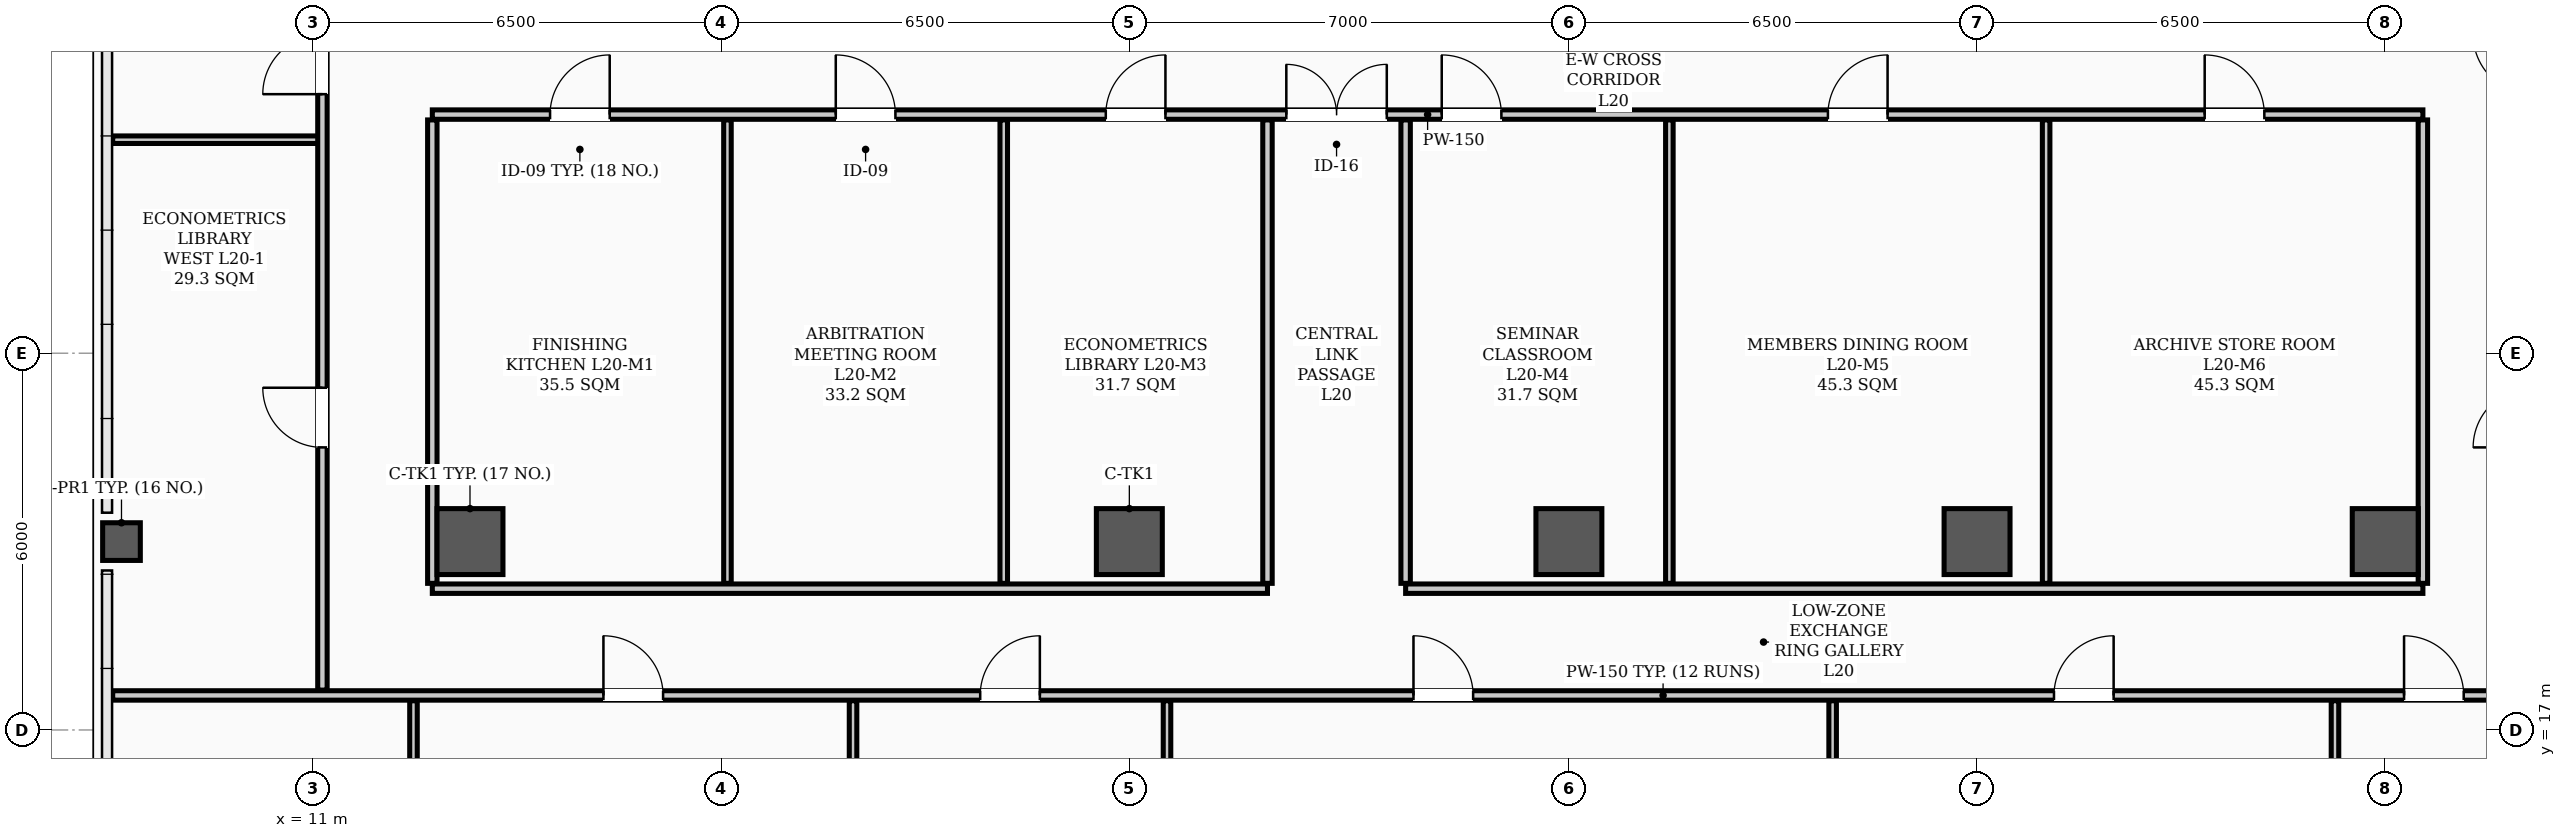
"""IFC4 building model, lengths in metres.
Left out: names, types, materials, properties, quantities, classifications, styles, units other than length and angle.
Written with IfcOpenShell. Run it as: python <this file> out.ifc"""

import sys

from ifc_helpers import new_model, si_unit, direction, frame, frame_2d, origin, origin_2d, place, context, subcontext, project, spatial, rectangle, hollow_rectangle, extrude, element, fill, save


model = new_model("IFC4")
c1 = context("Model", 3, precision=1e-05, world=origin(), true_north=direction((0.0, 1.0)))
c2 = subcontext(c1, "Body", "Model", "MODEL_VIEW")
j1 = project(units=[si_unit("LENGTHUNIT", "METRE"), si_unit("PLANEANGLEUNIT", "RADIAN")], contexts=[c1])
p1 = place(None, origin())
s1 = spatial("IfcSite", under=j1, at=p1, CompositionType="ELEMENT")
p2 = place(p1, origin())
s2 = spatial("IfcBuilding", under=s1, at=p2, CompositionType="ELEMENT")
p3 = place(p2, frame((0.0, 0.0, 81.1)))
s3 = spatial("IfcBuildingStorey", under=s2, at=p3, CompositionType="ELEMENT", Elevation=81.1)
for number, where, z_axis, x_axis in (
    (1, (13.5, 20.0, 0.0), (0.0, 0.0, 1.0), (1.0, 0.0, 0.0)),
    (2, (24.0, 20.0, 0.0), (0.0, 0.0, 1.0), (1.0, 0.0, 0.0)),
    (3, (31.0, 20.0, 0.0), (0.0, 0.0, 1.0), (1.0, 0.0, 0.0)),
    (4, (37.5, 20.0, 0.0), (0.0, 0.0, 1.0), (1.0, 0.0, 0.0)),
    (5, (44.0, 20.0, 0.0), (0.0, 0.0, 1.0), (1.0, 0.0, 0.0)),
):
    element("IfcColumn", number, at=place(p3, frame(where, z_axis=z_axis, x_axis=x_axis)), inside=s3, PredefinedType="COLUMN", context=c2, shape_type="SweptSolid", body=[
        extrude(hollow_rectangle(XDim=1.05, YDim=1.05, WallThickness=0.038, InnerFilletRadius=0.019, OuterFilletRadius=0.057, at=origin_2d()), origin(), (0.0, 0.0, 1.0), 3.9),
    ])
p4 = place(p3, frame((7.95, 20.0, 0.0), z_axis=(0.0, 0.0, 1.0), x_axis=(1.0, 0.0, 0.0)))
e6 = element("IfcColumn", 6, at=p4, inside=s3, PredefinedType="COLUMN", context=c2, shape_type="SweptSolid", body=[
    extrude(hollow_rectangle(XDim=0.6, YDim=0.6, WallThickness=0.026, InnerFilletRadius=0.013, OuterFilletRadius=0.039, at=origin_2d()), origin(), (0.0, 0.0, 1.0), 3.9),
])
p5 = place(p3, frame((12.9, 26.8, 0.0), z_axis=(0.0, 0.0, 1.0), x_axis=(1.0, 0.0, 0.0)))
e7 = element("IfcWall", 7, at=p5, inside=s3, PredefinedType="PARTITIONING", context=c2, shape_type="SweptSolid", body=[
    extrude(rectangle(XDim=31.7, YDim=0.15, at=frame_2d((15.85, 0.0))), origin(), (0.0, 0.0, 1.0), 3.1),
])
p6 = place(p5, frame((13.6, 0.0, 0.0)))
e8 = element("IfcOpeningElement", 8, at=p6, cuts=e7, PredefinedType="OPENING", context=c2, shape_type="SweptSolid", body=[
    extrude(rectangle(XDim=1.6, YDim=2.08, at=frame_2d((0.8, 1.04))), frame((0.0, 0.085, 0.0), z_axis=(0.0, -1.0, 0.0), x_axis=(1.0, 0.0, 0.0)), (0.0, 0.0, 1.0), 0.17),
])
p7 = place(p5, frame((1.875, 0.0, 0.0)))
e9 = element("IfcOpeningElement", 9, at=p7, cuts=e7, PredefinedType="OPENING", context=c2, shape_type="SweptSolid", body=[
    extrude(rectangle(XDim=0.95, YDim=2.08, at=frame_2d((0.475, 1.04))), frame((0.0, 0.085, 0.0), z_axis=(0.0, -1.0, 0.0), x_axis=(1.0, 0.0, 0.0)), (0.0, 0.0, 1.0), 0.17),
])
p8 = place(p5, frame((6.425, 0.0, 0.0)))
e10 = element("IfcOpeningElement", 10, at=p8, cuts=e7, PredefinedType="OPENING", context=c2, shape_type="SweptSolid", body=[
    extrude(rectangle(XDim=0.95, YDim=2.08, at=frame_2d((0.475, 1.04))), frame((0.0, 0.085, 0.0), z_axis=(0.0, -1.0, 0.0), x_axis=(1.0, 0.0, 0.0)), (0.0, 0.0, 1.0), 0.17),
])
p9 = place(p5, frame((10.725, 0.0, 0.0)))
e11 = element("IfcOpeningElement", 11, at=p9, cuts=e7, PredefinedType="OPENING", context=c2, shape_type="SweptSolid", body=[
    extrude(rectangle(XDim=0.95, YDim=2.08, at=frame_2d((0.475, 1.04))), frame((0.0, 0.085, 0.0), z_axis=(0.0, -1.0, 0.0), x_axis=(1.0, 0.0, 0.0)), (0.0, 0.0, 1.0), 0.17),
])
p10 = place(p5, frame((16.075, 0.0, 0.0)))
e12 = element("IfcOpeningElement", 12, at=p10, cuts=e7, PredefinedType="OPENING", context=c2, shape_type="SweptSolid", body=[
    extrude(rectangle(XDim=0.95, YDim=2.08, at=frame_2d((0.475, 1.04))), frame((0.0, 0.085, 0.0), z_axis=(0.0, -1.0, 0.0), x_axis=(1.0, 0.0, 0.0)), (0.0, 0.0, 1.0), 0.17),
])
p11 = place(p5, frame((22.225, 0.0, 0.0)))
e13 = element("IfcOpeningElement", 13, at=p11, cuts=e7, PredefinedType="OPENING", context=c2, shape_type="SweptSolid", body=[
    extrude(rectangle(XDim=0.95, YDim=2.08, at=frame_2d((0.475, 1.04))), frame((0.0, 0.085, 0.0), z_axis=(0.0, -1.0, 0.0), x_axis=(1.0, 0.0, 0.0)), (0.0, 0.0, 1.0), 0.17),
])
p12 = place(p5, frame((28.225, 0.0, 0.0)))
e14 = element("IfcOpeningElement", 14, at=p12, cuts=e7, PredefinedType="OPENING", context=c2, shape_type="SweptSolid", body=[
    extrude(rectangle(XDim=0.95, YDim=2.08, at=frame_2d((0.475, 1.04))), frame((0.0, 0.085, 0.0), z_axis=(0.0, -1.0, 0.0), x_axis=(1.0, 0.0, 0.0)), (0.0, 0.0, 1.0), 0.17),
])
p13 = place(p3, frame((7.81, 17.55, 0.0), z_axis=(0.0, 0.0, 1.0), x_axis=(1.0, 0.0, 0.0)))
e15 = element("IfcWall", 15, at=p13, inside=s3, PredefinedType="PARTITIONING", context=c2, shape_type="SweptSolid", body=[
    extrude(rectangle(XDim=49.38, YDim=0.15, at=frame_2d((24.69, 0.0))), origin(), (0.0, 0.0, 1.0), 3.1),
])
p14 = place(p13, frame((7.815, 0.0, 0.0)))
e16 = element("IfcOpeningElement", 16, at=p14, cuts=e15, PredefinedType="OPENING", context=c2, shape_type="SweptSolid", body=[
    extrude(rectangle(XDim=0.95, YDim=2.08, at=frame_2d((0.475, 1.04))), frame((0.0, 0.085, 0.0), z_axis=(0.0, -1.0, 0.0), x_axis=(1.0, 0.0, 0.0)), (0.0, 0.0, 1.0), 0.17),
])
p15 = place(p13, frame((13.815, 0.0, 0.0)))
e17 = element("IfcOpeningElement", 17, at=p15, cuts=e15, PredefinedType="OPENING", context=c2, shape_type="SweptSolid", body=[
    extrude(rectangle(XDim=0.95, YDim=2.08, at=frame_2d((0.475, 1.04))), frame((0.0, 0.085, 0.0), z_axis=(0.0, -1.0, 0.0), x_axis=(1.0, 0.0, 0.0)), (0.0, 0.0, 1.0), 0.17),
])
p16 = place(p13, frame((20.715, 0.0, 0.0)))
e18 = element("IfcOpeningElement", 18, at=p16, cuts=e15, PredefinedType="OPENING", context=c2, shape_type="SweptSolid", body=[
    extrude(rectangle(XDim=0.95, YDim=2.08, at=frame_2d((0.475, 1.04))), frame((0.0, 0.085, 0.0), z_axis=(0.0, -1.0, 0.0), x_axis=(1.0, 0.0, 0.0)), (0.0, 0.0, 1.0), 0.17),
])
p17 = place(p13, frame((30.915, 0.0, 0.0)))
e19 = element("IfcOpeningElement", 19, at=p17, cuts=e15, PredefinedType="OPENING", context=c2, shape_type="SweptSolid", body=[
    extrude(rectangle(XDim=0.95, YDim=2.08, at=frame_2d((0.475, 1.04))), frame((0.0, 0.085, 0.0), z_axis=(0.0, -1.0, 0.0), x_axis=(1.0, 0.0, 0.0)), (0.0, 0.0, 1.0), 0.17),
])
p18 = place(p13, frame((36.49, 0.0, 0.0)))
e20 = element("IfcOpeningElement", 20, at=p18, cuts=e15, PredefinedType="OPENING", context=c2, shape_type="SweptSolid", body=[
    extrude(rectangle(XDim=0.95, YDim=2.08, at=frame_2d((0.475, 1.04))), frame((0.0, 0.085, 0.0), z_axis=(0.0, -1.0, 0.0), x_axis=(1.0, 0.0, 0.0)), (0.0, 0.0, 1.0), 0.17),
])
p19 = place(p3, frame((12.9, 19.25, 0.0), z_axis=(0.0, 0.0, 1.0), x_axis=(1.0, 0.0, 0.0)))
e21 = element("IfcWall", 21, at=p19, inside=s3, PredefinedType="PARTITIONING", context=c2, shape_type="SweptSolid", body=[
    extrude(rectangle(XDim=13.3, YDim=0.15, at=frame_2d((6.65, 0.0))), origin(), (0.0, 0.0, 1.0), 3.1),
])
p20 = place(p3, frame((28.4, 19.25, 0.0), z_axis=(0.0, 0.0, 1.0), x_axis=(1.0, 0.0, 0.0)))
e22 = element("IfcWall", 22, at=p20, inside=s3, PredefinedType="PARTITIONING", context=c2, shape_type="SweptSolid", body=[
    extrude(rectangle(XDim=16.2, YDim=0.15, at=frame_2d((8.1, 0.0))), origin(), (0.0, 0.0, 1.0), 3.1),
])
p21 = place(p3, frame((7.81, 26.4, 0.0), z_axis=(0.0, 0.0, 1.0), x_axis=(1.0, 0.0, 0.0)))
e23 = element("IfcWall", 23, at=p21, inside=s3, PredefinedType="PARTITIONING", context=c2, shape_type="SweptSolid", body=[
    extrude(rectangle(XDim=3.34, YDim=0.12, at=frame_2d((1.67, 0.0))), origin(), (0.0, 0.0, 1.0), 3.212),
])
for number, where, z_axis, x_axis in (
    (24, (26.2, 19.335, 0.0), (0.0, 0.0, 1.0), (0.0, 1.0, 0.0)),
    (25, (28.4, 19.335, 0.0), (0.0, 0.0, 1.0), (0.0, 1.0, 0.0)),
):
    element("IfcWall", number, at=place(p3, frame(where, z_axis=z_axis, x_axis=x_axis)), inside=s3, PredefinedType="PARTITIONING", context=c2, shape_type="SweptSolid", body=[
        extrude(rectangle(XDim=7.38, YDim=0.15, at=frame_2d((3.69, 0.0))), origin(), (0.0, 0.0, 1.0), 3.0),
    ])
p22 = place(p3, frame((11.15, 17.635, 0.0), z_axis=(0.0, 0.0, 1.0), x_axis=(0.0, 1.0, 0.0)))
e26 = element("IfcWall", 26, at=p22, inside=s3, PredefinedType="PARTITIONING", context=c2, shape_type="SweptSolid", body=[
    extrude(rectangle(XDim=20.58, YDim=0.15, at=frame_2d((10.29, 0.0))), origin(), (0.0, 0.0, 1.0), 3.0),
])
p23 = place(p22, frame((3.865, 0.0, 0.0)))
e27 = element("IfcOpeningElement", 27, at=p23, cuts=e26, PredefinedType="OPENING", context=c2, shape_type="SweptSolid", body=[
    extrude(rectangle(XDim=0.95, YDim=2.08, at=frame_2d((0.475, 1.04))), frame((0.0, 0.085, 0.0), z_axis=(0.0, -1.0, 0.0), x_axis=(1.0, 0.0, 0.0)), (0.0, 0.0, 1.0), 0.17),
])
p24 = place(p22, frame((9.49, 0.0, 0.0)))
e28 = element("IfcOpeningElement", 28, at=p24, cuts=e26, PredefinedType="OPENING", context=c2, shape_type="SweptSolid", body=[
    extrude(rectangle(XDim=0.95, YDim=2.08, at=frame_2d((0.475, 1.04))), frame((0.0, 0.085, 0.0), z_axis=(0.0, -1.0, 0.0), x_axis=(1.0, 0.0, 0.0)), (0.0, 0.0, 1.0), 0.17),
])
p25 = place(p22, frame((17.44, 0.0, 0.0)))
e29 = element("IfcOpeningElement", 29, at=p25, cuts=e26, PredefinedType="OPENING", context=c2, shape_type="SweptSolid", body=[
    extrude(rectangle(XDim=0.95, YDim=2.08, at=frame_2d((0.475, 1.04))), frame((0.0, 0.085, 0.0), z_axis=(0.0, -1.0, 0.0), x_axis=(1.0, 0.0, 0.0)), (0.0, 0.0, 1.0), 0.17),
])
for number, where, z_axis, x_axis in (
    (30, (12.9, 19.335, 0.0), (0.0, 0.0, 1.0), (0.0, 1.0, 0.0)),
    (31, (44.6, 19.335, 0.0), (0.0, 0.0, 1.0), (0.0, 1.0, 0.0)),
):
    element("IfcWall", number, at=place(p3, frame(where, z_axis=z_axis, x_axis=x_axis)), inside=s3, PredefinedType="PARTITIONING", context=c2, shape_type="SweptSolid", body=[
        extrude(rectangle(XDim=7.38, YDim=0.15, at=frame_2d((3.69, 0.0))), origin(), (0.0, 0.0, 1.0), 3.0),
    ])
p26 = place(p3, frame((12.6, 9.81, 0.0), z_axis=(0.0, 0.0, 1.0), x_axis=(0.0, 1.0, 0.0)))
e32 = element("IfcWall", 32, at=p26, inside=s3, PredefinedType="PARTITIONING", context=c2, shape_type="SweptSolid", body=[
    extrude(rectangle(XDim=7.655, YDim=0.12, at=frame_2d((3.828, 0.0))), origin(), (0.0, 0.0, 1.0), 3.72),
])
p27 = place(p26, frame((3.395, 0.0, 0.0)))
e33 = element("IfcOpeningElement", 33, at=p27, cuts=e32, PredefinedType="OPENING", context=c2, shape_type="SweptSolid", body=[
    extrude(rectangle(XDim=0.95, YDim=2.08, at=frame_2d((0.475, 1.04))), frame((0.0, 0.07, 0.0), z_axis=(0.0, -1.0, 0.0), x_axis=(1.0, 0.0, 0.0)), (0.0, 0.0, 1.0), 0.14),
])
p28 = place(p3, frame((19.6, 9.81, 0.0), z_axis=(0.0, 0.0, 1.0), x_axis=(0.0, 1.0, 0.0)))
e34 = element("IfcWall", 34, at=p28, inside=s3, PredefinedType="PARTITIONING", context=c2, shape_type="SweptSolid", body=[
    extrude(rectangle(XDim=7.655, YDim=0.12, at=frame_2d((3.828, 0.0))), origin(), (0.0, 0.0, 1.0), 3.212),
])
p29 = place(p3, frame((24.6, 11.57, 0.0), z_axis=(0.0, 0.0, 1.0), x_axis=(0.0, 1.0, 0.0)))
e35 = element("IfcWall", 35, at=p29, inside=s3, PredefinedType="PARTITIONING", context=c2, shape_type="SweptSolid", body=[
    extrude(rectangle(XDim=5.895, YDim=0.12, at=frame_2d((2.948, 0.0))), origin(), (0.0, 0.0, 1.0), 3.1),
])
for number, where, z_axis, x_axis in (
    (36, (35.2, 9.81, 0.0), (0.0, 0.0, 1.0), (0.0, 1.0, 0.0)),
    (37, (43.2, 9.81, 0.0), (0.0, 0.0, 1.0), (0.0, 1.0, 0.0)),
):
    element("IfcWall", number, at=place(p3, frame(where, z_axis=z_axis, x_axis=x_axis)), inside=s3, PredefinedType="PARTITIONING", context=c2, shape_type="SweptSolid", body=[
        extrude(rectangle(XDim=7.655, YDim=0.12, at=frame_2d((3.828, 0.0))), origin(), (0.0, 0.0, 1.0), 3.212),
    ])
for number, where, z_axis, x_axis in (
    (38, (17.6, 19.335, 0.0), (0.0, 0.0, 1.0), (0.0, 1.0, 0.0)),
    (39, (22.0, 19.335, 0.0), (0.0, 0.0, 1.0), (0.0, 1.0, 0.0)),
    (40, (32.6, 19.335, 0.0), (0.0, 0.0, 1.0), (0.0, 1.0, 0.0)),
    (41, (38.6, 19.335, 0.0), (0.0, 0.0, 1.0), (0.0, 1.0, 0.0)),
):
    element("IfcWall", number, at=place(p3, frame(where, z_axis=z_axis, x_axis=x_axis)), inside=s3, PredefinedType="PARTITIONING", context=c2, shape_type="SweptSolid", body=[
        extrude(rectangle(XDim=7.38, YDim=0.12, at=frame_2d((3.69, 0.0))), origin(), (0.0, 0.0, 1.0), 3.0),
    ])
p30 = place(p6, origin())
e42 = element("IfcDoor", 42, at=p30, inside=s3, OperationType="DOUBLE_DOOR_SINGLE_SWING", PredefinedType="DOOR", context=c2, shape_type="SweptSolid", body=[
    extrude(rectangle(XDim=1.6, YDim=2.08, at=frame_2d((0.8, 1.04))), frame((0.0, 0.025, 0.0), z_axis=(0.0, -1.0, 0.0), x_axis=(1.0, 0.0, 0.0)), (0.0, 0.0, 1.0), 0.05),
])
fill(e8, e42)
p31 = place(p14, origin())
e43 = element("IfcDoor", 43, at=p31, inside=s3, OperationType="SINGLE_SWING_LEFT", PredefinedType="DOOR", context=c2, shape_type="SweptSolid", body=[
    extrude(rectangle(XDim=0.95, YDim=2.08, at=frame_2d((0.475, 1.04))), frame((0.0, 0.025, 0.0), z_axis=(0.0, -1.0, 0.0), x_axis=(1.0, 0.0, 0.0)), (0.0, 0.0, 1.0), 0.05),
])
fill(e16, e43)
p32 = place(p15, origin())
e44 = element("IfcDoor", 44, at=p32, inside=s3, OperationType="SINGLE_SWING_RIGHT", PredefinedType="DOOR", context=c2, shape_type="SweptSolid", body=[
    extrude(rectangle(XDim=0.95, YDim=2.08, at=frame_2d((0.475, 1.04))), frame((0.0, 0.025, 0.0), z_axis=(0.0, -1.0, 0.0), x_axis=(1.0, 0.0, 0.0)), (0.0, 0.0, 1.0), 0.05),
])
fill(e17, e44)
p33 = place(p16, origin())
e45 = element("IfcDoor", 45, at=p33, inside=s3, OperationType="SINGLE_SWING_LEFT", PredefinedType="DOOR", context=c2, shape_type="SweptSolid", body=[
    extrude(rectangle(XDim=0.95, YDim=2.08, at=frame_2d((0.475, 1.04))), frame((0.0, 0.025, 0.0), z_axis=(0.0, -1.0, 0.0), x_axis=(1.0, 0.0, 0.0)), (0.0, 0.0, 1.0), 0.05),
])
fill(e18, e45)
p34 = place(p17, origin())
e46 = element("IfcDoor", 46, at=p34, inside=s3, OperationType="SINGLE_SWING_RIGHT", PredefinedType="DOOR", context=c2, shape_type="SweptSolid", body=[
    extrude(rectangle(XDim=0.95, YDim=2.08, at=frame_2d((0.475, 1.04))), frame((0.0, 0.025, 0.0), z_axis=(0.0, -1.0, 0.0), x_axis=(1.0, 0.0, 0.0)), (0.0, 0.0, 1.0), 0.05),
])
fill(e19, e46)
p35 = place(p18, origin())
e47 = element("IfcDoor", 47, at=p35, inside=s3, OperationType="SINGLE_SWING_LEFT", PredefinedType="DOOR", context=c2, shape_type="SweptSolid", body=[
    extrude(rectangle(XDim=0.95, YDim=2.08, at=frame_2d((0.475, 1.04))), frame((0.0, 0.025, 0.0), z_axis=(0.0, -1.0, 0.0), x_axis=(1.0, 0.0, 0.0)), (0.0, 0.0, 1.0), 0.05),
])
fill(e20, e47)
p36 = place(p7, origin())
e48 = element("IfcDoor", 48, at=p36, inside=s3, OperationType="SINGLE_SWING_RIGHT", PredefinedType="DOOR", context=c2, shape_type="SweptSolid", body=[
    extrude(rectangle(XDim=0.95, YDim=2.08, at=frame_2d((0.475, 1.04))), frame((0.0, 0.025, 0.0), z_axis=(0.0, -1.0, 0.0), x_axis=(1.0, 0.0, 0.0)), (0.0, 0.0, 1.0), 0.05),
])
fill(e9, e48)
p37 = place(p8, origin())
e49 = element("IfcDoor", 49, at=p37, inside=s3, OperationType="SINGLE_SWING_LEFT", PredefinedType="DOOR", context=c2, shape_type="SweptSolid", body=[
    extrude(rectangle(XDim=0.95, YDim=2.08, at=frame_2d((0.475, 1.04))), frame((0.0, 0.025, 0.0), z_axis=(0.0, -1.0, 0.0), x_axis=(1.0, 0.0, 0.0)), (0.0, 0.0, 1.0), 0.05),
])
fill(e10, e49)
p38 = place(p9, origin())
e50 = element("IfcDoor", 50, at=p38, inside=s3, OperationType="SINGLE_SWING_RIGHT", PredefinedType="DOOR", context=c2, shape_type="SweptSolid", body=[
    extrude(rectangle(XDim=0.95, YDim=2.08, at=frame_2d((0.475, 1.04))), frame((0.0, 0.025, 0.0), z_axis=(0.0, -1.0, 0.0), x_axis=(1.0, 0.0, 0.0)), (0.0, 0.0, 1.0), 0.05),
])
fill(e11, e50)
p39 = place(p10, origin())
e51 = element("IfcDoor", 51, at=p39, inside=s3, OperationType="SINGLE_SWING_LEFT", PredefinedType="DOOR", context=c2, shape_type="SweptSolid", body=[
    extrude(rectangle(XDim=0.95, YDim=2.08, at=frame_2d((0.475, 1.04))), frame((0.0, 0.025, 0.0), z_axis=(0.0, -1.0, 0.0), x_axis=(1.0, 0.0, 0.0)), (0.0, 0.0, 1.0), 0.05),
])
fill(e12, e51)
p40 = place(p11, origin())
e52 = element("IfcDoor", 52, at=p40, inside=s3, OperationType="SINGLE_SWING_RIGHT", PredefinedType="DOOR", context=c2, shape_type="SweptSolid", body=[
    extrude(rectangle(XDim=0.95, YDim=2.08, at=frame_2d((0.475, 1.04))), frame((0.0, 0.025, 0.0), z_axis=(0.0, -1.0, 0.0), x_axis=(1.0, 0.0, 0.0)), (0.0, 0.0, 1.0), 0.05),
])
fill(e13, e52)
p41 = place(p12, origin())
e53 = element("IfcDoor", 53, at=p41, inside=s3, OperationType="SINGLE_SWING_LEFT", PredefinedType="DOOR", context=c2, shape_type="SweptSolid", body=[
    extrude(rectangle(XDim=0.95, YDim=2.08, at=frame_2d((0.475, 1.04))), frame((0.0, 0.025, 0.0), z_axis=(0.0, -1.0, 0.0), x_axis=(1.0, 0.0, 0.0)), (0.0, 0.0, 1.0), 0.05),
])
fill(e14, e53)
p42 = place(p23, origin())
e54 = element("IfcDoor", 54, at=p42, inside=s3, OperationType="SINGLE_SWING_RIGHT", PredefinedType="DOOR", context=c2, shape_type="SweptSolid", body=[
    extrude(rectangle(XDim=0.95, YDim=2.08, at=frame_2d((0.475, 1.04))), frame((0.0, 0.025, 0.0), z_axis=(0.0, -1.0, 0.0), x_axis=(1.0, 0.0, 0.0)), (0.0, 0.0, 1.0), 0.05),
])
fill(e27, e54)
p43 = place(p24, origin())
e55 = element("IfcDoor", 55, at=p43, inside=s3, OperationType="SINGLE_SWING_LEFT", PredefinedType="DOOR", context=c2, shape_type="SweptSolid", body=[
    extrude(rectangle(XDim=0.95, YDim=2.08, at=frame_2d((0.475, 1.04))), frame((0.0, 0.025, 0.0), z_axis=(0.0, -1.0, 0.0), x_axis=(1.0, 0.0, 0.0)), (0.0, 0.0, 1.0), 0.05),
])
fill(e28, e55)
save(model, sys.argv[1])
